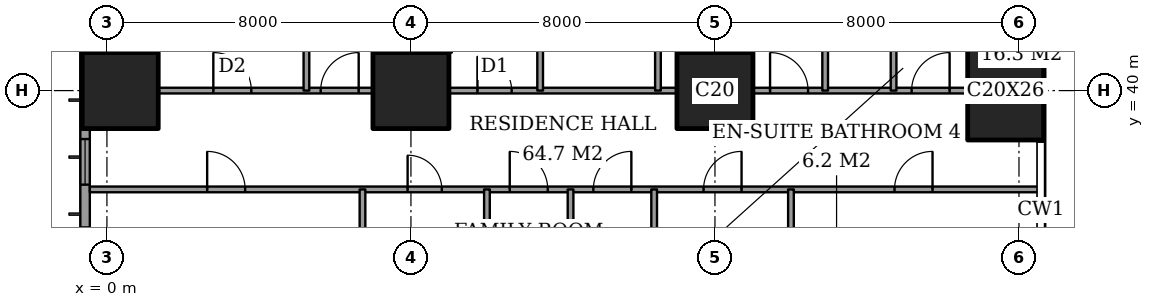
"""IFC4 building model, lengths in metres.
Left out: names, types, materials, properties, quantities, classifications, styles, units other than length and angle.
Written with IfcOpenShell. Run it as: python <this file> out.ifc"""

import sys

from ifc_helpers import new_model, si_unit, direction, frame, frame_2d, origin, origin_2d, place, context, subcontext, project, spatial, rectangle, extrude, element, fill, save


model = new_model("IFC4")
c1 = context("Model", 3, precision=1e-05, world=origin(), true_north=direction((0.0, 1.0)))
c2 = subcontext(c1, "Body", "Model", "MODEL_VIEW")
j1 = project(units=[si_unit("LENGTHUNIT", "METRE"), si_unit("PLANEANGLEUNIT", "RADIAN")], contexts=[c1])
p1 = place(None, origin())
s1 = spatial("IfcSite", under=j1, at=p1, CompositionType="ELEMENT")
p2 = place(p1, origin())
s2 = spatial("IfcBuilding", under=s1, at=p2, CompositionType="ELEMENT")
p3 = place(p2, frame((0.0, 0.0, 99.8)))
s3 = spatial("IfcBuildingStorey", under=s2, at=p3, CompositionType="ELEMENT", Elevation=99.8)
for number, where, z_axis, x_axis in (
    (1, (0.35, 40.0, 0.0), (0.0, 0.0, 1.0), (1.0, 0.0, 0.0)),
    (2, (8.0, 40.0, 0.0), (0.0, 0.0, 1.0), (1.0, 0.0, 0.0)),
    (3, (16.0, 40.0, 0.0), (0.0, 0.0, 1.0), (1.0, 0.0, 0.0)),
):
    element("IfcColumn", number, at=place(p3, frame(where, z_axis=z_axis, x_axis=x_axis)), inside=s3, PredefinedType="COLUMN", context=c2, shape_type="SweptSolid", body=[
        extrude(rectangle(XDim=2.0, YDim=2.0, at=origin_2d()), origin(), (0.0, 0.0, 1.0), 3.6),
    ])
p4 = place(p3, frame((23.65, 40.0, 0.0), z_axis=(0.0, 0.0, 1.0), x_axis=(1.0, 0.0, 0.0)))
e4 = element("IfcColumn", 4, at=p4, inside=s3, PredefinedType="COLUMN", context=c2, shape_type="SweptSolid", body=[
    extrude(rectangle(XDim=2.0, YDim=2.6, at=origin_2d()), origin(), (0.0, 0.0, 1.0), 3.6),
])
p5 = place(p3, frame((-0.575, 44.825, 0.0), z_axis=(0.0, 0.0, 1.0), x_axis=(0.0, -1.0, 0.0)))
e5 = element("IfcWall", 5, at=p5, inside=s3, PredefinedType="SOLIDWALL", context=c2, shape_type="SweptSolid", body=[
    extrude(rectangle(XDim=41.65, YDim=0.25, at=frame_2d((20.825, 0.0))), origin(), (0.0, 0.0, 1.0), 3.6),
])
p6 = place(p5, frame((0.775, 0.0, 0.4)))
e6 = element("IfcOpeningElement", 6, at=p6, cuts=e5, PredefinedType="OPENING", context=c2, shape_type="SweptSolid", body=[
    extrude(rectangle(XDim=2.4, YDim=2.2, at=frame_2d((1.2, 1.1))), frame((0.0, 0.135, 0.0), z_axis=(0.0, -1.0, 0.0), x_axis=(1.0, 0.0, 0.0)), (0.0, 0.0, 1.0), 0.27),
])
p7 = place(p5, frame((6.1, 0.0, 0.4)))
e7 = element("IfcOpeningElement", 7, at=p7, cuts=e5, PredefinedType="OPENING", context=c2, shape_type="SweptSolid", body=[
    extrude(rectangle(XDim=1.2, YDim=2.2, at=frame_2d((0.6, 1.1))), frame((0.0, 0.135, 0.0), z_axis=(0.0, -1.0, 0.0), x_axis=(1.0, 0.0, 0.0)), (0.0, 0.0, 1.0), 0.27),
])
p8 = place(p5, frame((8.425, 0.0, 0.4)))
e8 = element("IfcOpeningElement", 8, at=p8, cuts=e5, PredefinedType="OPENING", context=c2, shape_type="SweptSolid", body=[
    extrude(rectangle(XDim=2.4, YDim=2.2, at=frame_2d((1.2, 1.1))), frame((0.0, 0.135, 0.0), z_axis=(0.0, -1.0, 0.0), x_axis=(1.0, 0.0, 0.0)), (0.0, 0.0, 1.0), 0.27),
])
p9 = place(p5, frame((15.625, 0.0, 0.4)))
e9 = element("IfcOpeningElement", 9, at=p9, cuts=e5, PredefinedType="OPENING", context=c2, shape_type="SweptSolid", body=[
    extrude(rectangle(XDim=2.4, YDim=2.2, at=frame_2d((1.2, 1.1))), frame((0.0, 0.135, 0.0), z_axis=(0.0, -1.0, 0.0), x_axis=(1.0, 0.0, 0.0)), (0.0, 0.0, 1.0), 0.27),
])
p10 = place(p5, frame((23.625, 0.0, 0.4)))
e10 = element("IfcOpeningElement", 10, at=p10, cuts=e5, PredefinedType="OPENING", context=c2, shape_type="SweptSolid", body=[
    extrude(rectangle(XDim=2.4, YDim=2.2, at=frame_2d((1.2, 1.1))), frame((0.0, 0.135, 0.0), z_axis=(0.0, -1.0, 0.0), x_axis=(1.0, 0.0, 0.0)), (0.0, 0.0, 1.0), 0.27),
])
p11 = place(p5, frame((30.725, 0.0, 0.4)))
e11 = element("IfcOpeningElement", 11, at=p11, cuts=e5, PredefinedType="OPENING", context=c2, shape_type="SweptSolid", body=[
    extrude(rectangle(XDim=2.4, YDim=2.2, at=frame_2d((1.2, 1.1))), frame((0.0, 0.135, 0.0), z_axis=(0.0, -1.0, 0.0), x_axis=(1.0, 0.0, 0.0)), (0.0, 0.0, 1.0), 0.27),
])
p12 = place(p5, frame((34.325, 0.0, 0.4)))
e12 = element("IfcOpeningElement", 12, at=p12, cuts=e5, PredefinedType="OPENING", context=c2, shape_type="SweptSolid", body=[
    extrude(rectangle(XDim=1.2, YDim=2.2, at=frame_2d((0.6, 1.1))), frame((0.0, 0.135, 0.0), z_axis=(0.0, -1.0, 0.0), x_axis=(1.0, 0.0, 0.0)), (0.0, 0.0, 1.0), 0.27),
])
p13 = place(p5, frame((38.475, 0.0, 0.4)))
e13 = element("IfcOpeningElement", 13, at=p13, cuts=e5, PredefinedType="OPENING", context=c2, shape_type="SweptSolid", body=[
    extrude(rectangle(XDim=2.4, YDim=2.2, at=frame_2d((1.2, 1.1))), frame((0.0, 0.135, 0.0), z_axis=(0.0, -1.0, 0.0), x_axis=(1.0, 0.0, 0.0)), (0.0, 0.0, 1.0), 0.27),
])
p14 = place(p3, frame((-0.45, 37.4, 0.0), z_axis=(0.0, 0.0, 1.0), x_axis=(1.0, 0.0, 0.0)))
e14 = element("IfcWall", 14, at=p14, inside=s3, PredefinedType="PARTITIONING", context=c2, shape_type="SweptSolid", body=[
    extrude(rectangle(XDim=25.011, YDim=0.15, at=frame_2d((12.505, 0.0))), origin(), (0.0, 0.0, 1.0), 3.35),
])
p15 = place(p14, frame((13.25, 0.0, 0.0)))
e15 = element("IfcOpeningElement", 15, at=p15, cuts=e14, PredefinedType="OPENING", context=c2, shape_type="SweptSolid", body=[
    extrude(rectangle(XDim=1.0, YDim=2.1, at=frame_2d((0.5, 1.05))), frame((0.0, 0.085, 0.0), z_axis=(0.0, -1.0, 0.0), x_axis=(1.0, 0.0, 0.0)), (0.0, 0.0, 1.0), 0.17),
])
p16 = place(p14, frame((3.087, 0.0, 0.0)))
e16 = element("IfcOpeningElement", 16, at=p16, cuts=e14, PredefinedType="OPENING", context=c2, shape_type="SweptSolid", body=[
    extrude(rectangle(XDim=1.0, YDim=2.1, at=frame_2d((0.5, 1.05))), frame((0.0, 0.085, 0.0), z_axis=(0.0, -1.0, 0.0), x_axis=(1.0, 0.0, 0.0)), (0.0, 0.0, 1.0), 0.17),
])
p17 = place(p14, frame((8.363, 0.0, 0.0)))
e17 = element("IfcOpeningElement", 17, at=p17, cuts=e14, PredefinedType="OPENING", context=c2, shape_type="SweptSolid", body=[
    extrude(rectangle(XDim=0.9, YDim=2.1, at=frame_2d((0.45, 1.05))), frame((0.0, 0.085, 0.0), z_axis=(0.0, -1.0, 0.0), x_axis=(1.0, 0.0, 0.0)), (0.0, 0.0, 1.0), 0.17),
])
p18 = place(p14, frame((11.05, 0.0, 0.0)))
e18 = element("IfcOpeningElement", 18, at=p18, cuts=e14, PredefinedType="OPENING", context=c2, shape_type="SweptSolid", body=[
    extrude(rectangle(XDim=1.0, YDim=2.1, at=frame_2d((0.5, 1.05))), frame((0.0, 0.085, 0.0), z_axis=(0.0, -1.0, 0.0), x_axis=(1.0, 0.0, 0.0)), (0.0, 0.0, 1.0), 0.17),
])
p19 = place(p14, frame((16.15, 0.0, 0.0)))
e19 = element("IfcOpeningElement", 19, at=p19, cuts=e14, PredefinedType="OPENING", context=c2, shape_type="SweptSolid", body=[
    extrude(rectangle(XDim=1.0, YDim=2.1, at=frame_2d((0.5, 1.05))), frame((0.0, 0.085, 0.0), z_axis=(0.0, -1.0, 0.0), x_axis=(1.0, 0.0, 0.0)), (0.0, 0.0, 1.0), 0.17),
])
p20 = place(p14, frame((21.175, 0.0, 0.0)))
e20 = element("IfcOpeningElement", 20, at=p20, cuts=e14, PredefinedType="OPENING", context=c2, shape_type="SweptSolid", body=[
    extrude(rectangle(XDim=1.0, YDim=2.1, at=frame_2d((0.5, 1.05))), frame((0.0, 0.085, 0.0), z_axis=(0.0, -1.0, 0.0), x_axis=(1.0, 0.0, 0.0)), (0.0, 0.0, 1.0), 0.17),
])
p21 = place(p3, frame((1.35, 40.0, 0.0), z_axis=(0.0, 0.0, 1.0), x_axis=(1.0, 0.0, 0.0)))
e21 = element("IfcWall", 21, at=p21, inside=s3, PredefinedType="PARTITIONING", context=c2, shape_type="SweptSolid", body=[
    extrude(rectangle(XDim=5.65, YDim=0.15, at=frame_2d((2.825, 0.0))), origin(), (0.0, 0.0, 1.0), 3.35),
])
p22 = place(p21, frame((1.45, 0.0, 0.0)))
e22 = element("IfcOpeningElement", 22, at=p22, cuts=e21, PredefinedType="OPENING", context=c2, shape_type="SweptSolid", body=[
    extrude(rectangle(XDim=1.0, YDim=2.1, at=frame_2d((0.5, 1.05))), frame((0.0, 0.085, 0.0), z_axis=(0.0, -1.0, 0.0), x_axis=(1.0, 0.0, 0.0)), (0.0, 0.0, 1.0), 0.17),
])
p23 = place(p21, frame((4.275, 0.0, 0.0)))
e23 = element("IfcOpeningElement", 23, at=p23, cuts=e21, PredefinedType="OPENING", context=c2, shape_type="SweptSolid", body=[
    extrude(rectangle(XDim=1.0, YDim=2.1, at=frame_2d((0.5, 1.05))), frame((0.0, 0.085, 0.0), z_axis=(0.0, -1.0, 0.0), x_axis=(1.0, 0.0, 0.0)), (0.0, 0.0, 1.0), 0.17),
])
p24 = place(p3, frame((9.0, 40.0, 0.0), z_axis=(0.0, 0.0, 1.0), x_axis=(1.0, 0.0, 0.0)))
e24 = element("IfcWall", 24, at=p24, inside=s3, PredefinedType="PARTITIONING", context=c2, shape_type="SweptSolid", body=[
    extrude(rectangle(XDim=6.0, YDim=0.15, at=frame_2d((3.0, 0.0))), origin(), (0.0, 0.0, 1.0), 3.35),
])
p25 = place(p24, frame((0.75, 0.0, 0.0)))
e25 = element("IfcOpeningElement", 25, at=p25, cuts=e24, PredefinedType="OPENING", context=c2, shape_type="SweptSolid", body=[
    extrude(rectangle(XDim=0.9, YDim=2.1, at=frame_2d((0.45, 1.05))), frame((0.0, 0.085, 0.0), z_axis=(0.0, -1.0, 0.0), x_axis=(1.0, 0.0, 0.0)), (0.0, 0.0, 1.0), 0.17),
])
p26 = place(p3, frame((17.0, 40.0, 0.0), z_axis=(0.0, 0.0, 1.0), x_axis=(1.0, 0.0, 0.0)))
e26 = element("IfcWall", 26, at=p26, inside=s3, PredefinedType="PARTITIONING", context=c2, shape_type="SweptSolid", body=[
    extrude(rectangle(XDim=5.65, YDim=0.15, at=frame_2d((2.825, 0.0))), origin(), (0.0, 0.0, 1.0), 3.35),
])
p27 = place(p26, frame((0.45, 0.0, 0.0)))
e27 = element("IfcOpeningElement", 27, at=p27, cuts=e26, PredefinedType="OPENING", context=c2, shape_type="SweptSolid", body=[
    extrude(rectangle(XDim=1.0, YDim=2.1, at=frame_2d((0.5, 1.05))), frame((0.0, 0.085, 0.0), z_axis=(0.0, -1.0, 0.0), x_axis=(1.0, 0.0, 0.0)), (0.0, 0.0, 1.0), 0.17),
])
p28 = place(p26, frame((4.175, 0.0, 0.0)))
e28 = element("IfcOpeningElement", 28, at=p28, cuts=e26, PredefinedType="OPENING", context=c2, shape_type="SweptSolid", body=[
    extrude(rectangle(XDim=1.0, YDim=2.1, at=frame_2d((0.5, 1.05))), frame((0.0, 0.085, 0.0), z_axis=(0.0, -1.0, 0.0), x_axis=(1.0, 0.0, 0.0)), (0.0, 0.0, 1.0), 0.17),
])
p29 = place(p3, frame((5.25, 40.0, 0.0), z_axis=(0.0, 0.0, 1.0), x_axis=(0.0, 1.0, 0.0)))
e29 = element("IfcWall", 29, at=p29, inside=s3, PredefinedType="PARTITIONING", context=c2, shape_type="SweptSolid", body=[
    extrude(rectangle(XDim=8.45, YDim=0.15, at=frame_2d((4.225, 0.0))), origin(), (0.0, 0.0, 1.0), 3.35),
])
p30 = place(p3, frame((6.725, 33.2, 0.0), z_axis=(0.0, 0.0, 1.0), x_axis=(0.0, 1.0, 0.0)))
e30 = element("IfcWall", 30, at=p30, inside=s3, PredefinedType="PARTITIONING", context=c2, shape_type="SweptSolid", body=[
    extrude(rectangle(XDim=4.2, YDim=0.15, at=frame_2d((2.1, 0.0))), origin(), (0.0, 0.0, 1.0), 3.35),
])
p31 = place(p3, frame((10.0, 28.0, 0.0), z_axis=(0.0, 0.0, 1.0), x_axis=(0.0, 1.0, 0.0)))
e31 = element("IfcWall", 31, at=p31, inside=s3, PredefinedType="PARTITIONING", context=c2, shape_type="SweptSolid", body=[
    extrude(rectangle(XDim=9.4, YDim=0.15, at=frame_2d((4.7, 0.0))), origin(), (0.0, 0.0, 1.0), 3.35),
])
p32 = place(p31, frame((0.5, 0.0, 0.0)))
e32 = element("IfcOpeningElement", 32, at=p32, cuts=e31, PredefinedType="OPENING", context=c2, shape_type="SweptSolid", body=[
    extrude(rectangle(XDim=1.0, YDim=2.1, at=frame_2d((0.5, 1.05))), frame((0.0, 0.085, 0.0), z_axis=(0.0, -1.0, 0.0), x_axis=(1.0, 0.0, 0.0)), (0.0, 0.0, 1.0), 0.17),
])
p33 = place(p3, frame((11.4, 40.0, 0.0), z_axis=(0.0, 0.0, 1.0), x_axis=(0.0, 1.0, 0.0)))
e33 = element("IfcWall", 33, at=p33, inside=s3, PredefinedType="PARTITIONING", context=c2, shape_type="SweptSolid", body=[
    extrude(rectangle(XDim=8.45, YDim=0.15, at=frame_2d((4.225, 0.0))), origin(), (0.0, 0.0, 1.0), 3.35),
])
for number, where, z_axis, x_axis in (
    (34, (12.2, 30.0, 0.0), (0.0, 0.0, 1.0), (0.0, 1.0, 0.0)),
    (35, (14.4, 30.0, 0.0), (0.0, 0.0, 1.0), (0.0, 1.0, 0.0)),
):
    element("IfcWall", number, at=place(p3, frame(where, z_axis=z_axis, x_axis=x_axis)), inside=s3, PredefinedType="PARTITIONING", context=c2, shape_type="SweptSolid", body=[
        extrude(rectangle(XDim=7.4, YDim=0.15, at=frame_2d((3.7, 0.0))), origin(), (0.0, 0.0, 1.0), 3.35),
    ])
p34 = place(p3, frame((14.5, 40.0, 0.0), z_axis=(0.0, 0.0, 1.0), x_axis=(0.0, 1.0, 0.0)))
e36 = element("IfcWall", 36, at=p34, inside=s3, PredefinedType="PARTITIONING", context=c2, shape_type="SweptSolid", body=[
    extrude(rectangle(XDim=8.45, YDim=0.15, at=frame_2d((4.225, 0.0))), origin(), (0.0, 0.0, 1.0), 3.35),
])
p35 = place(p34, frame((3.775, 0.0, 0.0)))
e37 = element("IfcOpeningElement", 37, at=p35, cuts=e36, PredefinedType="OPENING", context=c2, shape_type="SweptSolid", body=[
    extrude(rectangle(XDim=0.9, YDim=2.1, at=frame_2d((0.45, 1.05))), frame((0.0, 0.085, 0.0), z_axis=(0.0, -1.0, 0.0), x_axis=(1.0, 0.0, 0.0)), (0.0, 0.0, 1.0), 0.17),
])
p36 = place(p3, frame((18.0, 28.0, 0.0), z_axis=(0.0, 0.0, 1.0), x_axis=(0.0, 1.0, 0.0)))
e38 = element("IfcWall", 38, at=p36, inside=s3, PredefinedType="PARTITIONING", context=c2, shape_type="SweptSolid", body=[
    extrude(rectangle(XDim=9.4, YDim=0.15, at=frame_2d((4.7, 0.0))), origin(), (0.0, 0.0, 1.0), 3.35),
])
p37 = place(p36, frame((0.55, 0.0, 0.0)))
e39 = element("IfcOpeningElement", 39, at=p37, cuts=e38, PredefinedType="OPENING", context=c2, shape_type="SweptSolid", body=[
    extrude(rectangle(XDim=0.9, YDim=2.1, at=frame_2d((0.45, 1.05))), frame((0.0, 0.085, 0.0), z_axis=(0.0, -1.0, 0.0), x_axis=(1.0, 0.0, 0.0)), (0.0, 0.0, 1.0), 0.17),
])
p38 = place(p3, frame((18.9, 40.0, 0.0), z_axis=(0.0, 0.0, 1.0), x_axis=(0.0, 1.0, 0.0)))
e40 = element("IfcWall", 40, at=p38, inside=s3, PredefinedType="PARTITIONING", context=c2, shape_type="SweptSolid", body=[
    extrude(rectangle(XDim=8.45, YDim=0.15, at=frame_2d((4.225, 0.0))), origin(), (0.0, 0.0, 1.0), 3.35),
])
p39 = place(p3, frame((20.7, 40.0, 0.0), z_axis=(0.0, 0.0, 1.0), x_axis=(0.0, 1.0, 0.0)))
e41 = element("IfcWall", 41, at=p39, inside=s3, PredefinedType="PARTITIONING", context=c2, shape_type="SweptSolid", body=[
    extrude(rectangle(XDim=8.45, YDim=0.15, at=frame_2d((4.225, 0.0))), origin(), (0.0, 0.0, 1.0), 3.35),
])
p40 = place(p39, frame((3.775, 0.0, 0.0)))
e42 = element("IfcOpeningElement", 42, at=p40, cuts=e41, PredefinedType="OPENING", context=c2, shape_type="SweptSolid", body=[
    extrude(rectangle(XDim=0.9, YDim=2.1, at=frame_2d((0.45, 1.05))), frame((0.0, 0.085, 0.0), z_axis=(0.0, -1.0, 0.0), x_axis=(1.0, 0.0, 0.0)), (0.0, 0.0, 1.0), 0.17),
])
p41 = place(p7, origin())
e43 = element("IfcWindow", 43, at=p41, inside=s3, PartitioningType="SINGLE_PANEL", PredefinedType="WINDOW", context=c2, shape_type="SweptSolid", body=[
    extrude(rectangle(XDim=1.2, YDim=2.2, at=frame_2d((0.6, 1.1))), frame((0.0, 0.03, 0.0), z_axis=(0.0, -1.0, 0.0), x_axis=(1.0, 0.0, 0.0)), (0.0, 0.0, 1.0), 0.06),
])
fill(e7, e43)
p42 = place(p22, origin())
e44 = element("IfcDoor", 44, at=p42, inside=s3, OperationType="SINGLE_SWING_RIGHT", PredefinedType="DOOR", context=c2, shape_type="SweptSolid", body=[
    extrude(rectangle(XDim=1.0, YDim=2.1, at=frame_2d((0.5, 1.05))), frame((0.0, 0.025, 0.0), z_axis=(0.0, -1.0, 0.0), x_axis=(1.0, 0.0, 0.0)), (0.0, 0.0, 1.0), 0.05),
])
fill(e22, e44)
p43 = place(p23, origin())
e45 = element("IfcDoor", 45, at=p43, inside=s3, OperationType="SINGLE_SWING_LEFT", PredefinedType="DOOR", context=c2, shape_type="SweptSolid", body=[
    extrude(rectangle(XDim=1.0, YDim=2.1, at=frame_2d((0.5, 1.05))), frame((0.0, 0.025, 0.0), z_axis=(0.0, -1.0, 0.0), x_axis=(1.0, 0.0, 0.0)), (0.0, 0.0, 1.0), 0.05),
])
fill(e23, e45)
p44 = place(p25, origin())
e46 = element("IfcDoor", 46, at=p44, inside=s3, OperationType="SINGLE_SWING_RIGHT", PredefinedType="DOOR", context=c2, shape_type="SweptSolid", body=[
    extrude(rectangle(XDim=0.9, YDim=2.1, at=frame_2d((0.45, 1.05))), frame((0.0, 0.025, 0.0), z_axis=(0.0, -1.0, 0.0), x_axis=(1.0, 0.0, 0.0)), (0.0, 0.0, 1.0), 0.05),
])
fill(e25, e46)
p45 = place(p27, origin())
e47 = element("IfcDoor", 47, at=p45, inside=s3, OperationType="SINGLE_SWING_RIGHT", PredefinedType="DOOR", context=c2, shape_type="SweptSolid", body=[
    extrude(rectangle(XDim=1.0, YDim=2.1, at=frame_2d((0.5, 1.05))), frame((0.0, 0.025, 0.0), z_axis=(0.0, -1.0, 0.0), x_axis=(1.0, 0.0, 0.0)), (0.0, 0.0, 1.0), 0.05),
])
fill(e27, e47)
p46 = place(p28, origin())
e48 = element("IfcDoor", 48, at=p46, inside=s3, OperationType="SINGLE_SWING_LEFT", PredefinedType="DOOR", context=c2, shape_type="SweptSolid", body=[
    extrude(rectangle(XDim=1.0, YDim=2.1, at=frame_2d((0.5, 1.05))), frame((0.0, 0.025, 0.0), z_axis=(0.0, -1.0, 0.0), x_axis=(1.0, 0.0, 0.0)), (0.0, 0.0, 1.0), 0.05),
])
fill(e28, e48)
p47 = place(p15, origin())
e49 = element("IfcDoor", 49, at=p47, inside=s3, OperationType="SINGLE_SWING_LEFT", PredefinedType="DOOR", context=c2, shape_type="SweptSolid", body=[
    extrude(rectangle(XDim=1.0, YDim=2.1, at=frame_2d((0.5, 1.05))), frame((0.0, 0.025, 0.0), z_axis=(0.0, -1.0, 0.0), x_axis=(1.0, 0.0, 0.0)), (0.0, 0.0, 1.0), 0.05),
])
fill(e15, e49)
p48 = place(p16, origin())
e50 = element("IfcDoor", 50, at=p48, inside=s3, OperationType="SINGLE_SWING_RIGHT", PredefinedType="DOOR", context=c2, shape_type="SweptSolid", body=[
    extrude(rectangle(XDim=1.0, YDim=2.1, at=frame_2d((0.5, 1.05))), frame((0.0, 0.025, 0.0), z_axis=(0.0, -1.0, 0.0), x_axis=(1.0, 0.0, 0.0)), (0.0, 0.0, 1.0), 0.05),
])
fill(e16, e50)
p49 = place(p17, origin())
e51 = element("IfcDoor", 51, at=p49, inside=s3, OperationType="SINGLE_SWING_RIGHT", PredefinedType="DOOR", context=c2, shape_type="SweptSolid", body=[
    extrude(rectangle(XDim=0.9, YDim=2.1, at=frame_2d((0.45, 1.05))), frame((0.0, 0.025, 0.0), z_axis=(0.0, -1.0, 0.0), x_axis=(1.0, 0.0, 0.0)), (0.0, 0.0, 1.0), 0.05),
])
fill(e17, e51)
p50 = place(p18, origin())
e52 = element("IfcDoor", 52, at=p50, inside=s3, OperationType="SINGLE_SWING_RIGHT", PredefinedType="DOOR", context=c2, shape_type="SweptSolid", body=[
    extrude(rectangle(XDim=1.0, YDim=2.1, at=frame_2d((0.5, 1.05))), frame((0.0, 0.025, 0.0), z_axis=(0.0, -1.0, 0.0), x_axis=(1.0, 0.0, 0.0)), (0.0, 0.0, 1.0), 0.05),
])
fill(e18, e52)
p51 = place(p19, origin())
e53 = element("IfcDoor", 53, at=p51, inside=s3, OperationType="SINGLE_SWING_LEFT", PredefinedType="DOOR", context=c2, shape_type="SweptSolid", body=[
    extrude(rectangle(XDim=1.0, YDim=2.1, at=frame_2d((0.5, 1.05))), frame((0.0, 0.025, 0.0), z_axis=(0.0, -1.0, 0.0), x_axis=(1.0, 0.0, 0.0)), (0.0, 0.0, 1.0), 0.05),
])
fill(e19, e53)
p52 = place(p20, origin())
e54 = element("IfcDoor", 54, at=p52, inside=s3, OperationType="SINGLE_SWING_LEFT", PredefinedType="DOOR", context=c2, shape_type="SweptSolid", body=[
    extrude(rectangle(XDim=1.0, YDim=2.1, at=frame_2d((0.5, 1.05))), frame((0.0, 0.025, 0.0), z_axis=(0.0, -1.0, 0.0), x_axis=(1.0, 0.0, 0.0)), (0.0, 0.0, 1.0), 0.05),
])
fill(e20, e54)
save(model, sys.argv[1])
